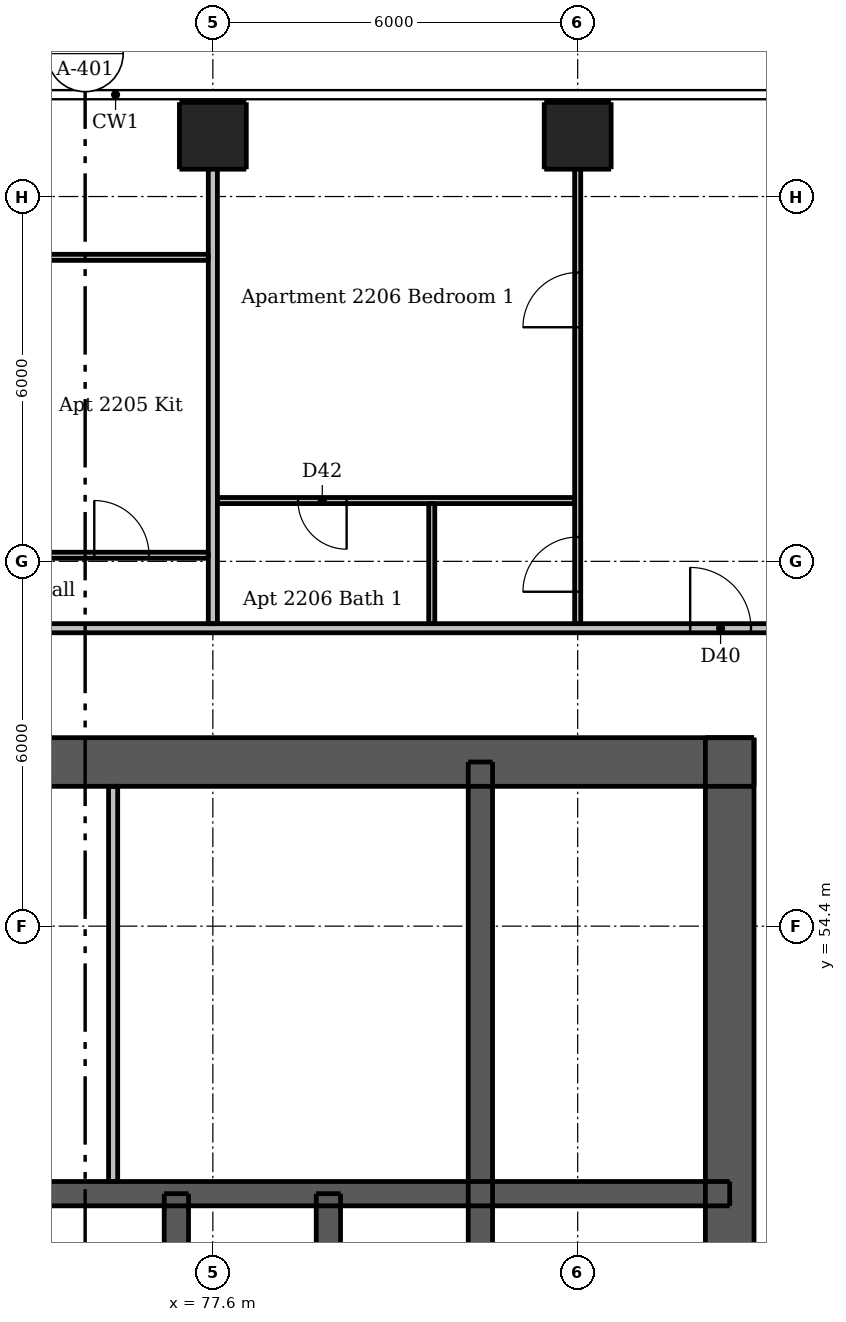
"""IFC4 building model, lengths in metres.
Left out: names, types, materials, properties, quantities, classifications, styles, units other than length and angle.
Written with IfcOpenShell. Run it as: python <this file> out.ifc"""

import sys

from ifc_helpers import new_model, si_unit, direction, frame, frame_2d, origin, origin_2d, place, context, subcontext, project, spatial, rectangle, extrude, element, fill, save


model = new_model("IFC4")
c1 = context("Model", 3, precision=1e-05, world=origin(), true_north=direction((0.0, 1.0)))
c2 = subcontext(c1, "Body", "Model", "MODEL_VIEW")
j1 = project(units=[si_unit("LENGTHUNIT", "METRE"), si_unit("PLANEANGLEUNIT", "RADIAN")], contexts=[c1])
p1 = place(None, origin())
s1 = spatial("IfcSite", under=j1, at=p1, CompositionType="ELEMENT")
p2 = place(p1, origin())
s2 = spatial("IfcBuilding", under=s1, at=p2, CompositionType="ELEMENT")
p3 = place(p2, frame((0.0, 0.0, 85.3)))
s3 = spatial("IfcBuildingStorey", under=s2, at=p3, CompositionType="ELEMENT", Elevation=85.3)
p4 = place(p3, frame((62.5, 57.1, 0.0), z_axis=(0.0, 0.0, 1.0), x_axis=(1.0, 0.0, 0.0)))
e1 = element("IfcWall", 1, at=p4, inside=s3, PredefinedType="SHEAR", context=c2, shape_type="SweptSolid", body=[
    extrude(rectangle(XDim=24.0, YDim=0.8, at=frame_2d((12.0, 0.0))), origin(), (0.0, 0.0, 1.0), 3.05),
])
p5 = place(p4, frame((20.9, 0.0, 0.0)))
e2 = element("IfcOpeningElement", 2, at=p5, cuts=e1, PredefinedType="OPENING", context=c2, shape_type="SweptSolid", body=[
    extrude(rectangle(XDim=1.1, YDim=2.1, at=frame_2d((0.55, 1.05))), frame((0.0, 0.41, 0.0), z_axis=(0.0, -1.0, 0.0), x_axis=(1.0, 0.0, 0.0)), (0.0, 0.0, 1.0), 0.82),
])
p6 = place(p4, frame((2.0, 0.0, 0.0)))
e3 = element("IfcOpeningElement", 3, at=p6, cuts=e1, PredefinedType="OPENING", context=c2, shape_type="SweptSolid", body=[
    extrude(rectangle(XDim=1.1, YDim=2.1, at=frame_2d((0.55, 1.05))), frame((0.0, 0.41, 0.0), z_axis=(0.0, -1.0, 0.0), x_axis=(1.0, 0.0, 0.0)), (0.0, 0.0, 1.0), 0.82),
])
p7 = place(p4, frame((6.075, 0.0, 0.0)))
e4 = element("IfcOpeningElement", 4, at=p7, cuts=e1, PredefinedType="OPENING", context=c2, shape_type="SweptSolid", body=[
    extrude(rectangle(XDim=0.9, YDim=2.1, at=frame_2d((0.45, 1.05))), frame((0.0, 0.41, 0.0), z_axis=(0.0, -1.0, 0.0), x_axis=(1.0, 0.0, 0.0)), (0.0, 0.0, 1.0), 0.82),
])
p8 = place(p4, frame((10.455, 0.0, 0.0)))
e5 = element("IfcOpeningElement", 5, at=p8, cuts=e1, PredefinedType="OPENING", context=c2, shape_type="SweptSolid", body=[
    extrude(rectangle(XDim=0.9, YDim=2.1, at=frame_2d((0.45, 1.05))), frame((0.0, 0.41, 0.0), z_axis=(0.0, -1.0, 0.0), x_axis=(1.0, 0.0, 0.0)), (0.0, 0.0, 1.0), 0.82),
])
p9 = place(p4, frame((15.93, 0.0, 0.0)))
e6 = element("IfcOpeningElement", 6, at=p9, cuts=e1, PredefinedType="OPENING", context=c2, shape_type="SweptSolid", body=[
    extrude(rectangle(XDim=0.9, YDim=2.1, at=frame_2d((0.45, 1.05))), frame((0.0, 0.41, 0.0), z_axis=(0.0, -1.0, 0.0), x_axis=(1.0, 0.0, 0.0)), (0.0, 0.0, 1.0), 0.82),
])
p10 = place(p3, frame((86.1, 33.5, 0.0), z_axis=(0.0, 0.0, 1.0), x_axis=(0.0, 1.0, 0.0)))
e7 = element("IfcWall", 7, at=p10, inside=s3, PredefinedType="SHEAR", context=c2, shape_type="SweptSolid", body=[
    extrude(rectangle(XDim=24.0, YDim=0.8, at=frame_2d((12.0, 0.0))), origin(), (0.0, 0.0, 1.0), 3.05),
])
p11 = place(p10, frame((11.2, 0.0, 0.0)))
e8 = element("IfcOpeningElement", 8, at=p11, cuts=e7, PredefinedType="OPENING", context=c2, shape_type="SweptSolid", body=[
    extrude(rectangle(XDim=1.6, YDim=2.1, at=frame_2d((0.8, 1.05))), frame((0.0, 0.41, 0.0), z_axis=(0.0, -1.0, 0.0), x_axis=(1.0, 0.0, 0.0)), (0.0, 0.0, 1.0), 0.82),
])
p12 = place(p3, frame((62.9, 50.0, 0.0), z_axis=(0.0, 0.0, 1.0), x_axis=(1.0, 0.0, 0.0)))
e9 = element("IfcWall", 9, at=p12, inside=s3, PredefinedType="SHEAR", context=c2, shape_type="SweptSolid", body=[
    extrude(rectangle(XDim=23.2, YDim=0.4, at=frame_2d((11.6, 0.0))), origin(), (0.0, 0.0, 1.0), 3.05),
])
p13 = place(p3, frame((82.0, 47.1, 0.0), z_axis=(0.0, 0.0, 1.0), x_axis=(0.0, 1.0, 0.0)))
e10 = element("IfcWall", 10, at=p13, inside=s3, PredefinedType="SHEAR", context=c2, shape_type="SweptSolid", body=[
    extrude(rectangle(XDim=10.0, YDim=0.4, at=frame_2d((5.0, 0.0))), origin(), (0.0, 0.0, 1.0), 3.05),
])
for number, where, z_axis, x_axis in (
    (11, (77.0, 47.1, 0.0), (0.0, 0.0, 1.0), (0.0, 1.0, 0.0)),
    (12, (79.5, 47.1, 0.0), (0.0, 0.0, 1.0), (0.0, 1.0, 0.0)),
):
    element("IfcWall", number, at=place(p3, frame(where, z_axis=z_axis, x_axis=x_axis)), inside=s3, PredefinedType="SHEAR", context=c2, shape_type="SweptSolid", body=[
        extrude(rectangle(XDim=2.9, YDim=0.4, at=frame_2d((1.45, 0.0))), origin(), (0.0, 0.0, 1.0), 3.05),
    ])
for number, where, z_axis, x_axis in (
    (13, (77.6, 67.4, 0.0), (0.0, 0.0, 1.0), (1.0, 0.0, 0.0)),
    (14, (83.6, 67.4, 0.0), (0.0, 0.0, 1.0), (1.0, 0.0, 0.0)),
):
    element("IfcColumn", number, at=place(p3, frame(where, z_axis=z_axis, x_axis=x_axis)), inside=s3, PredefinedType="COLUMN", context=c2, shape_type="SweptSolid", body=[
        extrude(rectangle(XDim=1.1, YDim=1.1, at=origin_2d()), origin(), (0.0, 0.0, 1.0), 3.05),
    ])
p14 = place(p3, frame((75.96, 50.2, 0.0), z_axis=(0.0, 0.0, 1.0), x_axis=(0.0, 1.0, 0.0)))
e15 = element("IfcWall", 15, at=p14, inside=s3, PredefinedType="PLUMBINGWALL", context=c2, shape_type="SweptSolid", body=[
    extrude(rectangle(XDim=6.5, YDim=0.15, at=frame_2d((3.25, 0.0))), origin(), (0.0, 0.0, 1.0), 3.05),
])
p15 = place(p3, frame((81.2, 59.375, 0.0), z_axis=(0.0, 0.0, 1.0), x_axis=(0.0, 1.0, 0.0)))
e16 = element("IfcWall", 16, at=p15, inside=s3, PredefinedType="PARTITIONING", context=c2, shape_type="SweptSolid", body=[
    extrude(rectangle(XDim=1.975, YDim=0.1, at=frame_2d((0.988, 0.0))), origin(), (0.0, 0.0, 1.0), 3.05),
])
p16 = place(p3, frame((83.6, 59.375, 0.0), z_axis=(0.0, 0.0, 1.0), x_axis=(0.0, 1.0, 0.0)))
e17 = element("IfcWall", 17, at=p16, inside=s3, PredefinedType="PARTITIONING", context=c2, shape_type="SweptSolid", body=[
    extrude(rectangle(XDim=8.625, YDim=0.1, at=frame_2d((4.312, 0.0))), origin(), (0.0, 0.0, 1.0), 2.516),
])
p17 = place(p16, frame((0.525, 0.0, 0.0)))
e18 = element("IfcOpeningElement", 18, at=p17, cuts=e17, PredefinedType="OPENING", context=c2, shape_type="SweptSolid", body=[
    extrude(rectangle(XDim=0.9, YDim=2.1, at=frame_2d((0.45, 1.05))), frame((0.0, 0.06, 0.0), z_axis=(0.0, -1.0, 0.0), x_axis=(1.0, 0.0, 0.0)), (0.0, 0.0, 1.0), 0.12),
])
p18 = place(p16, frame((4.875, 0.0, 0.0)))
e19 = element("IfcOpeningElement", 19, at=p18, cuts=e17, PredefinedType="OPENING", context=c2, shape_type="SweptSolid", body=[
    extrude(rectangle(XDim=0.9, YDim=2.1, at=frame_2d((0.45, 1.05))), frame((0.0, 0.06, 0.0), z_axis=(0.0, -1.0, 0.0), x_axis=(1.0, 0.0, 0.0)), (0.0, 0.0, 1.0), 0.12),
])
p19 = place(p3, frame((72.85, 65.4, 0.0), z_axis=(0.0, 0.0, 1.0), x_axis=(1.0, 0.0, 0.0)))
e20 = element("IfcWall", 20, at=p19, inside=s3, PredefinedType="PARTITIONING", context=c2, shape_type="SweptSolid", body=[
    extrude(rectangle(XDim=4.675, YDim=0.1, at=frame_2d((2.337, 0.0))), origin(), (0.0, 0.0, 1.0), 3.05),
])
p20 = place(p3, frame((83.55, 61.4, 0.0), z_axis=(0.0, 0.0, 1.0), x_axis=(-1.0, 0.0, 0.0)))
e21 = element("IfcWall", 21, at=p20, inside=s3, PredefinedType="PARTITIONING", context=c2, shape_type="SweptSolid", body=[
    extrude(rectangle(XDim=5.875, YDim=0.1, at=frame_2d((2.938, 0.0))), origin(), (0.0, 0.0, 1.0), 3.05),
])
p21 = place(p20, frame((3.75, 0.0, 0.0)))
e22 = element("IfcOpeningElement", 22, at=p21, cuts=e21, PredefinedType="OPENING", context=c2, shape_type="SweptSolid", body=[
    extrude(rectangle(XDim=0.8, YDim=2.1, at=frame_2d((0.4, 1.05))), frame((0.0, 0.06, 0.0), z_axis=(0.0, -1.0, 0.0), x_axis=(1.0, 0.0, 0.0)), (0.0, 0.0, 1.0), 0.12),
])
p22 = place(p3, frame((60.75, 60.5, 0.0), z_axis=(0.0, 0.0, 1.0), x_axis=(1.0, 0.0, 0.0)))
e23 = element("IfcWall", 23, at=p22, inside=s3, PredefinedType="PARTITIONING", context=c2, shape_type="SweptSolid", body=[
    extrude(rectangle(XDim=16.775, YDim=0.1, at=frame_2d((8.387, 0.0))), origin(), (0.0, 0.0, 1.0), 3.05),
])
p23 = place(p22, frame((8.9, 0.0, 0.0)))
e24 = element("IfcOpeningElement", 24, at=p23, cuts=e23, PredefinedType="OPENING", context=c2, shape_type="SweptSolid", body=[
    extrude(rectangle(XDim=0.9, YDim=2.1, at=frame_2d((0.45, 1.05))), frame((0.0, 0.06, 0.0), z_axis=(0.0, -1.0, 0.0), x_axis=(1.0, 0.0, 0.0)), (0.0, 0.0, 1.0), 0.12),
])
p24 = place(p22, frame((14.9, 0.0, 0.0)))
e25 = element("IfcOpeningElement", 25, at=p24, cuts=e23, PredefinedType="OPENING", context=c2, shape_type="SweptSolid", body=[
    extrude(rectangle(XDim=0.9, YDim=2.1, at=frame_2d((0.45, 1.05))), frame((0.0, 0.06, 0.0), z_axis=(0.0, -1.0, 0.0), x_axis=(1.0, 0.0, 0.0)), (0.0, 0.0, 1.0), 0.12),
])
p25 = place(p22, frame((12.5, 0.0, 0.0)))
e26 = element("IfcOpeningElement", 26, at=p25, cuts=e23, PredefinedType="OPENING", context=c2, shape_type="SweptSolid", body=[
    extrude(rectangle(XDim=0.9, YDim=2.1, at=frame_2d((0.45, 1.05))), frame((0.0, 0.06, 0.0), z_axis=(0.0, -1.0, 0.0), x_axis=(1.0, 0.0, 0.0)), (0.0, 0.0, 1.0), 0.12),
])
p26 = place(p22, frame((5.35, 0.0, 0.0)))
e27 = element("IfcOpeningElement", 27, at=p26, cuts=e23, PredefinedType="OPENING", context=c2, shape_type="SweptSolid", body=[
    extrude(rectangle(XDim=0.8, YDim=2.1, at=frame_2d((0.4, 1.05))), frame((0.0, 0.06, 0.0), z_axis=(0.0, -1.0, 0.0), x_axis=(1.0, 0.0, 0.0)), (0.0, 0.0, 1.0), 0.12),
])
p27 = place(p22, frame((0.75, 0.0, 0.0)))
e28 = element("IfcOpeningElement", 28, at=p27, cuts=e23, PredefinedType="OPENING", context=c2, shape_type="SweptSolid", body=[
    extrude(rectangle(XDim=0.9, YDim=2.1, at=frame_2d((0.45, 1.05))), frame((0.0, 0.06, 0.0), z_axis=(0.0, -1.0, 0.0), x_axis=(1.0, 0.0, 0.0)), (0.0, 0.0, 1.0), 0.12),
])
p28 = place(p22, frame((3.25, 0.0, 0.0)))
e29 = element("IfcOpeningElement", 29, at=p28, cuts=e23, PredefinedType="OPENING", context=c2, shape_type="SweptSolid", body=[
    extrude(rectangle(XDim=0.8, YDim=2.1, at=frame_2d((0.4, 1.05))), frame((0.0, 0.06, 0.0), z_axis=(0.0, -1.0, 0.0), x_axis=(1.0, 0.0, 0.0)), (0.0, 0.0, 1.0), 0.12),
])
p29 = place(p3, frame((77.6, 59.375, 0.0), z_axis=(0.0, 0.0, 1.0), x_axis=(0.0, 1.0, 0.0)))
e30 = element("IfcWall", 30, at=p29, inside=s3, PredefinedType="PARTITIONING", context=c2, shape_type="SweptSolid", body=[
    extrude(rectangle(XDim=8.625, YDim=0.15, at=frame_2d((4.312, 0.0))), origin(), (0.0, 0.0, 1.0), 2.516),
])
p30 = place(p3, frame((59.675, 59.3, 0.0), z_axis=(0.0, 0.0, 1.0), x_axis=(1.0, 0.0, 0.0)))
e31 = element("IfcWall", 31, at=p30, inside=s3, PredefinedType="PARTITIONING", context=c2, shape_type="SweptSolid", body=[
    extrude(rectangle(XDim=28.55, YDim=0.15, at=frame_2d((14.275, 0.0))), origin(), (0.0, 0.0, 1.0), 3.05),
])
p31 = place(p30, frame((8.975, 0.0, 0.0)))
e32 = element("IfcOpeningElement", 32, at=p31, cuts=e31, PredefinedType="OPENING", context=c2, shape_type="SweptSolid", body=[
    extrude(rectangle(XDim=1.0, YDim=2.1, at=frame_2d((0.5, 1.05))), frame((0.0, 0.085, 0.0), z_axis=(0.0, -1.0, 0.0), x_axis=(1.0, 0.0, 0.0)), (0.0, 0.0, 1.0), 0.17),
])
p32 = place(p30, frame((25.775, 0.0, 0.0)))
e33 = element("IfcOpeningElement", 33, at=p32, cuts=e31, PredefinedType="OPENING", context=c2, shape_type="SweptSolid", body=[
    extrude(rectangle(XDim=1.0, YDim=2.1, at=frame_2d((0.5, 1.05))), frame((0.0, 0.085, 0.0), z_axis=(0.0, -1.0, 0.0), x_axis=(1.0, 0.0, 0.0)), (0.0, 0.0, 1.0), 0.17),
])
p33 = place(p5, origin())
e34 = element("IfcDoor", 34, at=p33, inside=s3, OperationType="SINGLE_SWING_RIGHT", PredefinedType="DOOR", context=c2, shape_type="SweptSolid", body=[
    extrude(rectangle(XDim=1.1, YDim=2.1, at=frame_2d((0.55, 1.05))), frame((0.0, -0.337, 0.0), z_axis=(0.0, -1.0, 0.0), x_axis=(1.0, 0.0, 0.0)), (0.0, 0.0, 1.0), 0.05),
])
fill(e2, e34)
p34 = place(p9, origin())
e35 = element("IfcDoor", 35, at=p34, inside=s3, OperationType="SINGLE_SWING_RIGHT", PredefinedType="DOOR", context=c2, shape_type="SweptSolid", body=[
    extrude(rectangle(XDim=0.9, YDim=2.1, at=frame_2d((0.45, 1.05))), frame((0.0, -0.337, 0.0), z_axis=(0.0, -1.0, 0.0), x_axis=(1.0, 0.0, 0.0)), (0.0, 0.0, 1.0), 0.05),
])
fill(e6, e35)
p35 = place(p24, origin())
e36 = element("IfcDoor", 36, at=p35, inside=s3, OperationType="SINGLE_SWING_LEFT", PredefinedType="DOOR", context=c2, shape_type="SweptSolid", body=[
    extrude(rectangle(XDim=0.9, YDim=2.1, at=frame_2d((0.45, 1.05))), frame((0.0, 0.025, 0.0), z_axis=(0.0, -1.0, 0.0), x_axis=(1.0, 0.0, 0.0)), (0.0, 0.0, 1.0), 0.05),
])
fill(e25, e36)
p36 = place(p32, origin())
e37 = element("IfcDoor", 37, at=p36, inside=s3, OperationType="SINGLE_SWING_LEFT", PredefinedType="DOOR", context=c2, shape_type="SweptSolid", body=[
    extrude(rectangle(XDim=1.0, YDim=2.1, at=frame_2d((0.5, 1.05))), frame((0.0, 0.025, 0.0), z_axis=(0.0, -1.0, 0.0), x_axis=(1.0, 0.0, 0.0)), (0.0, 0.0, 1.0), 0.05),
])
fill(e33, e37)
p37 = place(p17, origin())
e38 = element("IfcDoor", 38, at=p37, inside=s3, OperationType="SINGLE_SWING_LEFT", PredefinedType="DOOR", context=c2, shape_type="SweptSolid", body=[
    extrude(rectangle(XDim=0.9, YDim=2.1, at=frame_2d((0.45, 1.05))), frame((0.0, 0.025, 0.0), z_axis=(0.0, -1.0, 0.0), x_axis=(1.0, 0.0, 0.0)), (0.0, 0.0, 1.0), 0.05),
])
fill(e18, e38)
p38 = place(p18, origin())
e39 = element("IfcDoor", 39, at=p38, inside=s3, OperationType="SINGLE_SWING_LEFT", PredefinedType="DOOR", context=c2, shape_type="SweptSolid", body=[
    extrude(rectangle(XDim=0.9, YDim=2.1, at=frame_2d((0.45, 1.05))), frame((0.0, 0.025, 0.0), z_axis=(0.0, -1.0, 0.0), x_axis=(1.0, 0.0, 0.0)), (0.0, 0.0, 1.0), 0.05),
])
fill(e19, e39)
p39 = place(p21, origin())
e40 = element("IfcDoor", 40, at=p39, inside=s3, OperationType="SINGLE_SWING_LEFT", PredefinedType="DOOR", context=c2, shape_type="SweptSolid", body=[
    extrude(rectangle(XDim=0.8, YDim=2.1, at=frame_2d((0.4, 1.05))), frame((0.0, 0.025, 0.0), z_axis=(0.0, -1.0, 0.0), x_axis=(1.0, 0.0, 0.0)), (0.0, 0.0, 1.0), 0.05),
])
fill(e22, e40)
save(model, sys.argv[1])
